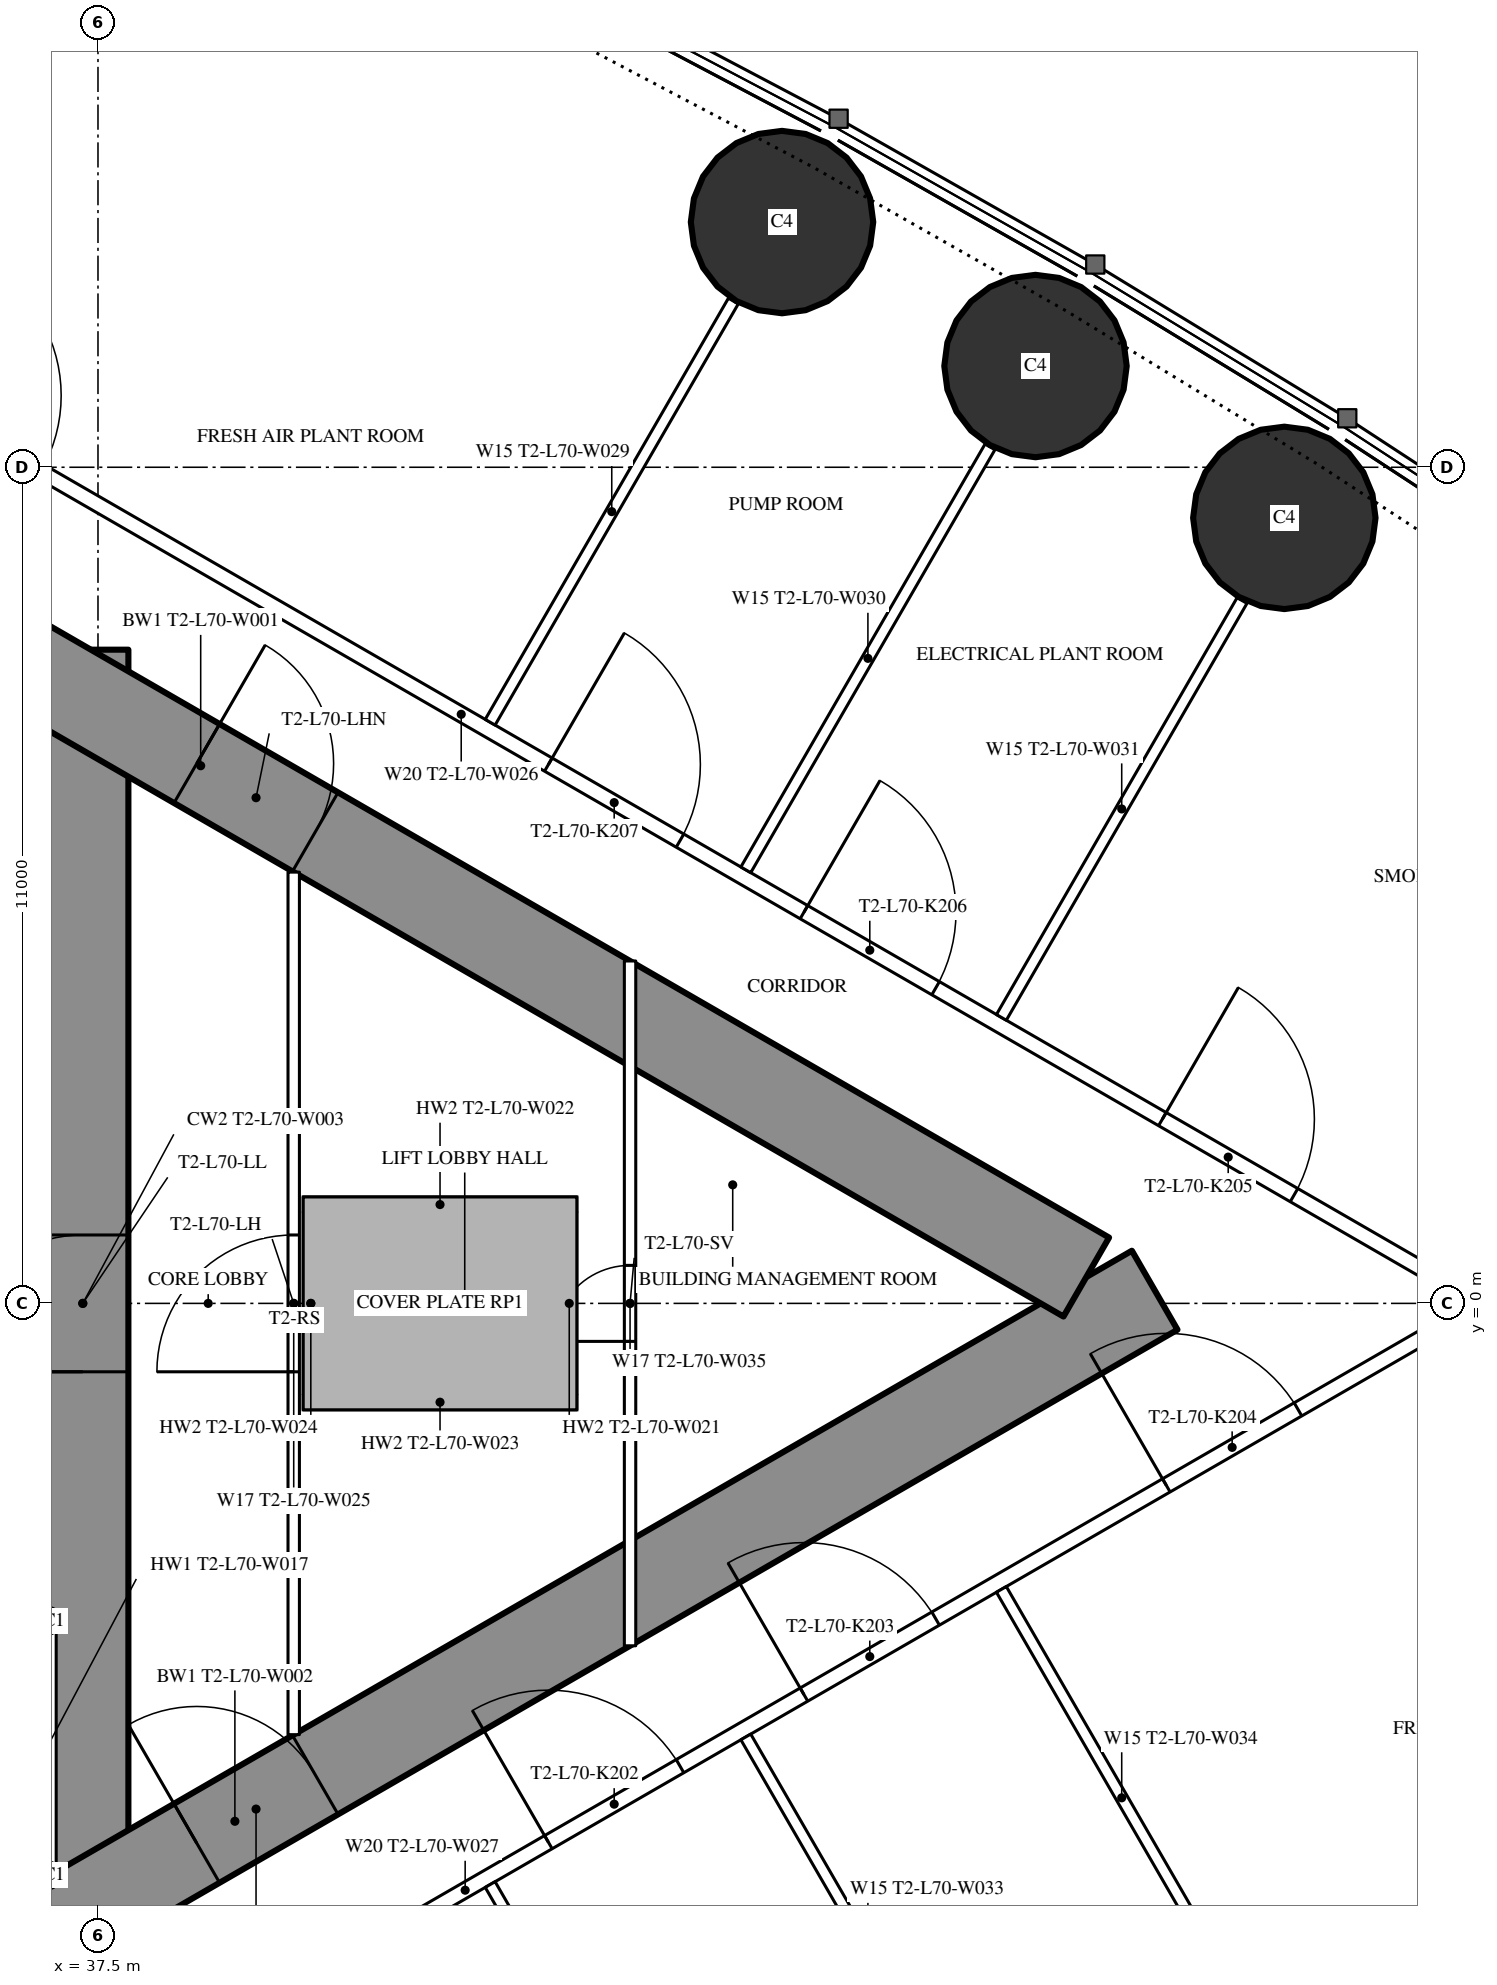
"""IFC4 building model, lengths in metres.
Left out: names, types, materials, properties, quantities, classifications, styles, units other than length and angle.
Written with IfcOpenShell. Run it as: python <this file> out.ifc"""

import sys

from ifc_helpers import new_model, si_unit, direction, frame, frame_2d, origin, origin_2d, place, context, subcontext, project, spatial, rectangle, circle, hollow_circle, extrude, element, fill, save


model = new_model("IFC4")
c1 = context("Model", 3, precision=1e-05, world=origin(), true_north=direction((0.0, 1.0)))
c2 = subcontext(c1, "Body", "Model", "MODEL_VIEW")
j1 = project(units=[si_unit("LENGTHUNIT", "METRE"), si_unit("PLANEANGLEUNIT", "RADIAN")], contexts=[c1])
p1 = place(None, origin())
s1 = spatial("IfcSite", under=j1, at=p1, CompositionType="ELEMENT")
p2 = place(p1, origin())
s2 = spatial("IfcBuilding", under=s1, at=p2, CompositionType="ELEMENT")
p3 = place(p2, frame((0.0, 0.0, 268.3)))
s3 = spatial("IfcBuildingStorey", under=s2, at=p3, CompositionType="ELEMENT", Elevation=268.3)
for number, where, z_axis, x_axis in (
    (1, (53.108, 10.334, 0.0), (0.0, 0.0, 1.0), (1.0, 0.0, 0.0)),
    (2, (49.834, 12.332, 0.0), (0.0, 0.0, 1.0), (1.0, 0.0, 0.0)),
    (3, (46.499, 14.226, 0.0), (0.0, 0.0, 1.0), (1.0, 0.0, 0.0)),
):
    element("IfcColumn", number, at=place(p3, frame(where, z_axis=z_axis, x_axis=x_axis)), inside=s3, PredefinedType="COLUMN", context=c2, shape_type="SweptSolid", body=[
        extrude(circle(Radius=1.2, at=origin_2d()), origin(), (0.0, 0.0, 1.0), 5.0),
    ])
p4 = place(p3, frame((37.3, -8.6, 0.0), z_axis=(0.0, 0.0, 1.0), x_axis=(0.0, 1.0, 0.0)))
e4 = element("IfcWall", 4, at=p4, inside=s3, PredefinedType="SHEAR", context=c2, shape_type="SweptSolid", body=[
    extrude(rectangle(XDim=17.2, YDim=1.2, at=frame_2d((8.6, 0.0))), origin(), (0.0, 0.0, 1.0), 5.0),
])
p5 = place(p4, frame((7.7, 0.0, 0.0)))
e5 = element("IfcOpeningElement", 5, at=p5, cuts=e4, PredefinedType="OPENING", context=c2, shape_type="SweptSolid", body=[
    extrude(rectangle(XDim=1.8, YDim=2.2, at=frame_2d((0.9, 1.1))), frame((0.0, 0.61, 0.0), z_axis=(0.0, -1.0, 0.0), x_axis=(1.0, 0.0, 0.0)), (0.0, 0.0, 1.0), 1.22),
])
p6 = place(p3, frame((27.2, -13.8, 0.0), z_axis=(0.0, 0.0, 1.0), x_axis=(0.866027159892, 0.499996958321, 0.0)))
e6 = element("IfcWall", 6, at=p6, inside=s3, PredefinedType="SHEAR", context=c2, shape_type="SweptSolid", body=[
    extrude(rectangle(XDim=27.947, YDim=1.2, at=frame_2d((13.973, 0.0))), origin(), (0.0, 0.0, 1.0), 5.0),
])
p7 = place(p6, frame((4.6, 0.0, 0.0)))
e7 = element("IfcOpeningElement", 7, at=p7, cuts=e6, PredefinedType="OPENING", context=c2, shape_type="SweptSolid", body=[
    extrude(rectangle(XDim=1.0, YDim=2.2, at=frame_2d((0.5, 1.1))), frame((0.0, 0.61, 0.0), z_axis=(0.0, -1.0, 0.0), x_axis=(1.0, 0.0, 0.0)), (0.0, 0.0, 1.0), 1.22),
])
p8 = place(p6, frame((13.395, 0.0, 0.0)))
e8 = element("IfcOpeningElement", 8, at=p8, cuts=e6, PredefinedType="OPENING", context=c2, shape_type="SweptSolid", body=[
    extrude(rectangle(XDim=1.8, YDim=2.2, at=frame_2d((0.9, 1.1))), frame((0.0, 0.61, 0.0), z_axis=(0.0, -1.0, 0.0), x_axis=(1.0, 0.0, 0.0)), (0.0, 0.0, 1.0), 1.22),
])
p9 = place(p3, frame((27.2, 13.8, 0.0), z_axis=(0.0, 0.0, 1.0), x_axis=(0.866024515034, -0.500001539357, 0.0)))
e9 = element("IfcWall", 9, at=p9, inside=s3, PredefinedType="SHEAR", context=c2, shape_type="SweptSolid", body=[
    extrude(rectangle(XDim=26.907, YDim=1.2, at=frame_2d((13.454, 0.0))), origin(), (0.0, 0.0, 1.0), 5.0),
])
p10 = place(p9, frame((4.6, 0.0, 0.0)))
e10 = element("IfcOpeningElement", 10, at=p10, cuts=e9, PredefinedType="OPENING", context=c2, shape_type="SweptSolid", body=[
    extrude(rectangle(XDim=1.0, YDim=2.2, at=frame_2d((0.5, 1.1))), frame((0.0, 0.61, 0.0), z_axis=(0.0, -1.0, 0.0), x_axis=(1.0, 0.0, 0.0)), (0.0, 0.0, 1.0), 1.22),
])
p11 = place(p9, frame((13.395, 0.0, 0.0)))
e11 = element("IfcOpeningElement", 11, at=p11, cuts=e9, PredefinedType="OPENING", context=c2, shape_type="SweptSolid", body=[
    extrude(rectangle(XDim=1.8, YDim=2.2, at=frame_2d((0.9, 1.1))), frame((0.0, 0.61, 0.0), z_axis=(0.0, -1.0, 0.0), x_axis=(1.0, 0.0, 0.0)), (0.0, 0.0, 1.0), 1.22),
])
for number, where, z_axis, x_axis in (
    (12, (36.825, -7.525, 5.0), (0.0, 0.0, 1.0), (1.0, 0.0, 0.0)),
    (13, (36.825, -4.175, 5.0), (0.0, 0.0, 1.0), (1.0, 0.0, 0.0)),
):
    element("IfcColumn", number, at=place(p3, frame(where, z_axis=z_axis, x_axis=x_axis)), inside=s3, PredefinedType="COLUMN", context=c2, shape_type="SweptSolid", body=[
        extrude(hollow_circle(Radius=0.162, WallThickness=0.012, at=origin_2d()), origin(), (0.0, 0.0, 1.0), 3.0),
    ])
p12 = place(p3, frame((36.825, -7.422, 5.0), z_axis=(0.0, 0.0, 1.0), x_axis=(0.0, 1.0, 0.0)))
e14 = element("IfcWall", 14, at=p12, inside=s3, PredefinedType="SOLIDWALL", context=c2, shape_type="SweptSolid", body=[
    extrude(rectangle(XDim=3.144, YDim=0.25, at=frame_2d((1.572, 0.0))), origin(), (0.0, 0.0, 1.0), 2.54),
])
for number, where, z_axis, x_axis in (
    (15, (40.2, -1.3, 5.0), (0.0, 0.0, 1.0), (1.0, 0.0, 0.0)),
    (16, (43.8, 1.3, 5.0), (0.0, 0.0, 1.0), (-1.0, 0.0, 0.0)),
):
    element("IfcWall", number, at=place(p3, frame(where, z_axis=z_axis, x_axis=x_axis)), inside=s3, PredefinedType="SOLIDWALL", context=c2, shape_type="SweptSolid", body=[
        extrude(rectangle(XDim=3.6, YDim=0.2, at=frame_2d((1.8, 0.0))), origin(), (0.0, 0.0, 1.0), 2.6),
    ])
p13 = place(p3, frame((40.3, 1.2, 5.0), z_axis=(0.0, 0.0, 1.0), x_axis=(0.0, -1.0, 0.0)))
e17 = element("IfcWall", 17, at=p13, inside=s3, PredefinedType="SOLIDWALL", context=c2, shape_type="SweptSolid", body=[
    extrude(rectangle(XDim=2.4, YDim=0.2, at=frame_2d((1.2, 0.0))), origin(), (0.0, 0.0, 1.0), 2.6),
])
p14 = place(p13, frame((0.7, 0.0, 0.0)))
e18 = element("IfcOpeningElement", 18, at=p14, cuts=e17, PredefinedType="OPENING", context=c2, shape_type="SweptSolid", body=[
    extrude(rectangle(XDim=1.0, YDim=2.2, at=frame_2d((0.5, 1.1))), frame((0.0, 0.11, 0.0), z_axis=(0.0, -1.0, 0.0), x_axis=(1.0, 0.0, 0.0)), (0.0, 0.0, 1.0), 0.22),
])
p15 = place(p3, frame((43.7, -1.2, 5.0), z_axis=(0.0, 0.0, 1.0), x_axis=(0.0, 1.0, 0.0)))
e19 = element("IfcWall", 19, at=p15, inside=s3, PredefinedType="SOLIDWALL", context=c2, shape_type="SweptSolid", body=[
    extrude(rectangle(XDim=2.4, YDim=0.2, at=frame_2d((1.2, 0.0))), origin(), (0.0, 0.0, 1.0), 2.6),
])
p16 = place(p3, frame((28.959, -15.44, 0.0), z_axis=(0.0, 0.0, 1.0), x_axis=(0.866025227435, 0.500000305447, 0.0)))
e20 = element("IfcWall", 20, at=p16, inside=s3, PredefinedType="PARTITIONING", context=c2, shape_type="SweptSolid", body=[
    extrude(rectangle(XDim=30.88, YDim=0.2, at=frame_2d((15.44, 0.0))), origin(), (0.0, 0.0, 1.0), 4.7),
])
p17 = place(p16, frame((6.994, 0.0, 0.0)))
e21 = element("IfcOpeningElement", 21, at=p17, cuts=e20, PredefinedType="OPENING", context=c2, shape_type="SweptSolid", body=[
    extrude(rectangle(XDim=2.0, YDim=2.4, at=frame_2d((1.0, 1.2))), frame((0.0, 0.11, 0.0), z_axis=(0.0, -1.0, 0.0), x_axis=(1.0, 0.0, 0.0)), (0.0, 0.0, 1.0), 0.22),
])
p18 = place(p16, frame((16.704, 0.0, 0.0)))
e22 = element("IfcOpeningElement", 22, at=p18, cuts=e20, PredefinedType="OPENING", context=c2, shape_type="SweptSolid", body=[
    extrude(rectangle(XDim=2.0, YDim=2.4, at=frame_2d((1.0, 1.2))), frame((0.0, 0.11, 0.0), z_axis=(0.0, -1.0, 0.0), x_axis=(1.0, 0.0, 0.0)), (0.0, 0.0, 1.0), 0.22),
])
p19 = place(p16, frame((20.587, 0.0, 0.0)))
e23 = element("IfcOpeningElement", 23, at=p19, cuts=e20, PredefinedType="OPENING", context=c2, shape_type="SweptSolid", body=[
    extrude(rectangle(XDim=2.0, YDim=2.4, at=frame_2d((1.0, 1.2))), frame((0.0, 0.11, 0.0), z_axis=(0.0, -1.0, 0.0), x_axis=(1.0, 0.0, 0.0)), (0.0, 0.0, 1.0), 0.22),
])
p20 = place(p16, frame((26.092, 0.0, 0.0)))
e24 = element("IfcOpeningElement", 24, at=p20, cuts=e20, PredefinedType="OPENING", context=c2, shape_type="SweptSolid", body=[
    extrude(rectangle(XDim=2.0, YDim=2.4, at=frame_2d((1.0, 1.2))), frame((0.0, 0.11, 0.0), z_axis=(0.0, -1.0, 0.0), x_axis=(1.0, 0.0, 0.0)), (0.0, 0.0, 1.0), 0.22),
])
p21 = place(p3, frame((28.959, 15.44, 0.0), z_axis=(0.0, 0.0, 1.0), x_axis=(0.866027378611, -0.499996579484, 0.0)))
e25 = element("IfcWall", 25, at=p21, inside=s3, PredefinedType="PARTITIONING", context=c2, shape_type="SweptSolid", body=[
    extrude(rectangle(XDim=30.76, YDim=0.2, at=frame_2d((15.38, 0.0))), origin(), (0.0, 0.0, 1.0), 4.7),
])
p22 = place(p21, frame((26.032, 0.0, 0.0)))
e26 = element("IfcOpeningElement", 26, at=p22, cuts=e25, PredefinedType="OPENING", context=c2, shape_type="SweptSolid", body=[
    extrude(rectangle(XDim=2.0, YDim=2.4, at=frame_2d((1.0, 1.2))), frame((0.0, 0.11, 0.0), z_axis=(0.0, -1.0, 0.0), x_axis=(1.0, 0.0, 0.0)), (0.0, 0.0, 1.0), 0.22),
])
p23 = place(p21, frame((20.587, 0.0, 0.0)))
e27 = element("IfcOpeningElement", 27, at=p23, cuts=e25, PredefinedType="OPENING", context=c2, shape_type="SweptSolid", body=[
    extrude(rectangle(XDim=2.0, YDim=2.4, at=frame_2d((1.0, 1.2))), frame((0.0, 0.11, 0.0), z_axis=(0.0, -1.0, 0.0), x_axis=(1.0, 0.0, 0.0)), (0.0, 0.0, 1.0), 0.22),
])
p24 = place(p21, frame((16.704, 0.0, 0.0)))
e28 = element("IfcOpeningElement", 28, at=p24, cuts=e25, PredefinedType="OPENING", context=c2, shape_type="SweptSolid", body=[
    extrude(rectangle(XDim=2.0, YDim=2.4, at=frame_2d((1.0, 1.2))), frame((0.0, 0.11, 0.0), z_axis=(0.0, -1.0, 0.0), x_axis=(1.0, 0.0, 0.0)), (0.0, 0.0, 1.0), 0.22),
])
p25 = place(p21, frame((6.994, 0.0, 0.0)))
e29 = element("IfcOpeningElement", 29, at=p25, cuts=e25, PredefinedType="OPENING", context=c2, shape_type="SweptSolid", body=[
    extrude(rectangle(XDim=2.0, YDim=2.4, at=frame_2d((1.0, 1.2))), frame((0.0, 0.11, 0.0), z_axis=(0.0, -1.0, 0.0), x_axis=(1.0, 0.0, 0.0)), (0.0, 0.0, 1.0), 0.22),
])
p26 = place(p3, frame((42.66, -7.646, 0.0), z_axis=(0.0, 0.0, 1.0), x_axis=(0.499996592859, -0.866027370889, 0.0)))
e30 = element("IfcWall", 30, at=p26, inside=s3, PredefinedType="PARTITIONING", context=c2, shape_type="SweptSolid", body=[
    extrude(rectangle(XDim=6.398, YDim=0.15, at=frame_2d((3.199, 0.0))), origin(), (0.0, 0.0, 1.0), 3.8),
])
p27 = place(p3, frame((46.023, -5.704, 0.0), z_axis=(0.0, 0.0, 1.0), x_axis=(0.499984478165, -0.866034365135, 0.0)))
e31 = element("IfcWall", 31, at=p27, inside=s3, PredefinedType="PARTITIONING", context=c2, shape_type="SweptSolid", body=[
    extrude(rectangle(XDim=6.426, YDim=0.15, at=frame_2d((3.213, 0.0))), origin(), (0.0, 0.0, 1.0), 3.8),
])
p28 = place(p3, frame((49.385, -3.763, 0.0), z_axis=(0.0, 0.0, 1.0), x_axis=(0.499999447814, -0.866025722589, 0.0)))
e32 = element("IfcWall", 32, at=p28, inside=s3, PredefinedType="PARTITIONING", context=c2, shape_type="SweptSolid", body=[
    extrude(rectangle(XDim=6.333, YDim=0.15, at=frame_2d((3.166, 0.0))), origin(), (0.0, 0.0, 1.0), 3.8),
])
p29 = place(p3, frame((42.66, 7.646, 0.0), z_axis=(0.0, 0.0, 1.0), x_axis=(0.499996592859, 0.866027370889, 0.0)))
e33 = element("IfcWall", 33, at=p29, inside=s3, PredefinedType="PARTITIONING", context=c2, shape_type="SweptSolid", body=[
    extrude(rectangle(XDim=6.398, YDim=0.15, at=frame_2d((3.199, 0.0))), origin(), (0.0, 0.0, 1.0), 3.8),
])
p30 = place(p3, frame((46.023, 5.704, 0.0), z_axis=(0.0, 0.0, 1.0), x_axis=(0.499984478165, 0.866034365135, 0.0)))
e34 = element("IfcWall", 34, at=p30, inside=s3, PredefinedType="PARTITIONING", context=c2, shape_type="SweptSolid", body=[
    extrude(rectangle(XDim=6.426, YDim=0.15, at=frame_2d((3.213, 0.0))), origin(), (0.0, 0.0, 1.0), 3.8),
])
p31 = place(p3, frame((49.385, 3.763, 0.0), z_axis=(0.0, 0.0, 1.0), x_axis=(0.499999447814, 0.866025722589, 0.0)))
e35 = element("IfcWall", 35, at=p31, inside=s3, PredefinedType="PARTITIONING", context=c2, shape_type="SweptSolid", body=[
    extrude(rectangle(XDim=6.333, YDim=0.15, at=frame_2d((3.166, 0.0))), origin(), (0.0, 0.0, 1.0), 3.8),
])
p32 = place(p3, frame((40.075, -5.674, 0.0), z_axis=(0.0, 0.0, 1.0), x_axis=(0.0, 1.0, 0.0)))
e36 = element("IfcWall", 36, at=p32, inside=s3, PredefinedType="PARTITIONING", context=c2, shape_type="SweptSolid", body=[
    extrude(rectangle(XDim=11.348, YDim=0.15, at=frame_2d((5.674, 0.0))), origin(), (0.0, 0.0, 1.0), 4.7),
])
p33 = place(p32, frame((4.774, 0.0, 0.0)))
e37 = element("IfcOpeningElement", 37, at=p33, cuts=e36, PredefinedType="OPENING", context=c2, shape_type="SweptSolid", body=[
    extrude(rectangle(XDim=1.8, YDim=2.2, at=frame_2d((0.9, 1.1))), frame((0.0, 0.085, 0.0), z_axis=(0.0, -1.0, 0.0), x_axis=(1.0, 0.0, 0.0)), (0.0, 0.0, 1.0), 0.17),
])
p34 = place(p3, frame((44.5, -4.505, 0.0), z_axis=(0.0, 0.0, 1.0), x_axis=(0.0, 1.0, 0.0)))
e38 = element("IfcWall", 38, at=p34, inside=s3, PredefinedType="PARTITIONING", context=c2, shape_type="SweptSolid", body=[
    extrude(rectangle(XDim=9.009, YDim=0.15, at=frame_2d((4.505, 0.0))), origin(), (0.0, 0.0, 1.0), 4.7),
])
p35 = place(p34, frame((4.005, 0.0, 0.0)))
e39 = element("IfcOpeningElement", 39, at=p35, cuts=e38, PredefinedType="OPENING", context=c2, shape_type="SweptSolid", body=[
    extrude(rectangle(XDim=1.0, YDim=2.2, at=frame_2d((0.5, 1.1))), frame((0.0, 0.085, 0.0), z_axis=(0.0, -1.0, 0.0), x_axis=(1.0, 0.0, 0.0)), (0.0, 0.0, 1.0), 0.17),
])
p36 = place(p14, origin())
e40 = element("IfcDoor", 40, at=p36, inside=s3, OperationType="SINGLE_SWING_LEFT", PredefinedType="DOOR", context=c2, shape_type="SweptSolid", body=[
    extrude(rectangle(XDim=1.0, YDim=2.2, at=frame_2d((0.5, 1.1))), frame((0.0, 0.025, 0.0), z_axis=(0.0, -1.0, 0.0), x_axis=(1.0, 0.0, 0.0)), (0.0, 0.0, 1.0), 0.05),
])
fill(e18, e40)
p37 = place(p18, origin())
e41 = element("IfcDoor", 41, at=p37, inside=s3, OperationType="DOUBLE_DOOR_SINGLE_SWING", PredefinedType="DOOR", context=c2, shape_type="SweptSolid", body=[
    extrude(rectangle(XDim=2.0, YDim=2.4, at=frame_2d((1.0, 1.2))), frame((0.0, 0.025, 0.0), z_axis=(0.0, -1.0, 0.0), x_axis=(1.0, 0.0, 0.0)), (0.0, 0.0, 1.0), 0.05),
])
fill(e22, e41)
p38 = place(p19, origin())
e42 = element("IfcDoor", 42, at=p38, inside=s3, OperationType="DOUBLE_DOOR_SINGLE_SWING", PredefinedType="DOOR", context=c2, shape_type="SweptSolid", body=[
    extrude(rectangle(XDim=2.0, YDim=2.4, at=frame_2d((1.0, 1.2))), frame((0.0, 0.025, 0.0), z_axis=(0.0, -1.0, 0.0), x_axis=(1.0, 0.0, 0.0)), (0.0, 0.0, 1.0), 0.05),
])
fill(e23, e42)
p39 = place(p20, origin())
e43 = element("IfcDoor", 43, at=p39, inside=s3, OperationType="DOUBLE_DOOR_SINGLE_SWING", PredefinedType="DOOR", context=c2, shape_type="SweptSolid", body=[
    extrude(rectangle(XDim=2.0, YDim=2.4, at=frame_2d((1.0, 1.2))), frame((0.0, 0.025, 0.0), z_axis=(0.0, -1.0, 0.0), x_axis=(1.0, 0.0, 0.0)), (0.0, 0.0, 1.0), 0.05),
])
fill(e24, e43)
p40 = place(p22, origin())
e44 = element("IfcDoor", 44, at=p40, inside=s3, OperationType="DOUBLE_DOOR_SINGLE_SWING", PredefinedType="DOOR", context=c2, shape_type="SweptSolid", body=[
    extrude(rectangle(XDim=2.0, YDim=2.4, at=frame_2d((1.0, 1.2))), frame((0.0, 0.025, 0.0), z_axis=(0.0, -1.0, 0.0), x_axis=(1.0, 0.0, 0.0)), (0.0, 0.0, 1.0), 0.05),
])
fill(e26, e44)
p41 = place(p23, origin())
e45 = element("IfcDoor", 45, at=p41, inside=s3, OperationType="DOUBLE_DOOR_SINGLE_SWING", PredefinedType="DOOR", context=c2, shape_type="SweptSolid", body=[
    extrude(rectangle(XDim=2.0, YDim=2.4, at=frame_2d((1.0, 1.2))), frame((0.0, 0.025, 0.0), z_axis=(0.0, -1.0, 0.0), x_axis=(1.0, 0.0, 0.0)), (0.0, 0.0, 1.0), 0.05),
])
fill(e27, e45)
p42 = place(p24, origin())
e46 = element("IfcDoor", 46, at=p42, inside=s3, OperationType="DOUBLE_DOOR_SINGLE_SWING", PredefinedType="DOOR", context=c2, shape_type="SweptSolid", body=[
    extrude(rectangle(XDim=2.0, YDim=2.4, at=frame_2d((1.0, 1.2))), frame((0.0, 0.025, 0.0), z_axis=(0.0, -1.0, 0.0), x_axis=(1.0, 0.0, 0.0)), (0.0, 0.0, 1.0), 0.05),
])
fill(e28, e46)
p43 = place(p33, origin())
e47 = element("IfcDoor", 47, at=p43, inside=s3, OperationType="DOUBLE_DOOR_SINGLE_SWING", PredefinedType="DOOR", context=c2, shape_type="SweptSolid", body=[
    extrude(rectangle(XDim=1.8, YDim=2.2, at=frame_2d((0.9, 1.1))), frame((0.0, 0.025, 0.0), z_axis=(0.0, -1.0, 0.0), x_axis=(1.0, 0.0, 0.0)), (0.0, 0.0, 1.0), 0.05),
])
fill(e37, e47)
p44 = place(p35, origin())
e48 = element("IfcDoor", 48, at=p44, inside=s3, OperationType="SINGLE_SWING_LEFT", PredefinedType="DOOR", context=c2, shape_type="SweptSolid", body=[
    extrude(rectangle(XDim=1.0, YDim=2.2, at=frame_2d((0.5, 1.1))), frame((0.0, 0.025, 0.0), z_axis=(0.0, -1.0, 0.0), x_axis=(1.0, 0.0, 0.0)), (0.0, 0.0, 1.0), 0.05),
])
fill(e39, e48)
p45 = place(p8, origin())
e49 = element("IfcDoor", 49, at=p45, inside=s3, OperationType="DOUBLE_DOOR_SINGLE_SWING", PredefinedType="DOOR", context=c2, shape_type="SweptSolid", body=[
    extrude(rectangle(XDim=1.8, YDim=2.2, at=frame_2d((0.9, 1.1))), frame((0.0, 0.025, 0.0), z_axis=(0.0, -1.0, 0.0), x_axis=(1.0, 0.0, 0.0)), (0.0, 0.0, 1.0), 0.05),
])
fill(e8, e49)
p46 = place(p11, origin())
e50 = element("IfcDoor", 50, at=p46, inside=s3, OperationType="DOUBLE_DOOR_SINGLE_SWING", PredefinedType="DOOR", context=c2, shape_type="SweptSolid", body=[
    extrude(rectangle(XDim=1.8, YDim=2.2, at=frame_2d((0.9, 1.1))), frame((0.0, 0.025, 0.0), z_axis=(0.0, -1.0, 0.0), x_axis=(1.0, 0.0, 0.0)), (0.0, 0.0, 1.0), 0.05),
])
fill(e11, e50)
p47 = place(p5, origin())
e51 = element("IfcDoor", 51, at=p47, inside=s3, OperationType="DOUBLE_DOOR_SINGLE_SWING", PredefinedType="DOOR", context=c2, shape_type="SweptSolid", body=[
    extrude(rectangle(XDim=1.8, YDim=2.2, at=frame_2d((0.9, 1.1))), frame((0.0, 0.025, 0.0), z_axis=(0.0, -1.0, 0.0), x_axis=(1.0, 0.0, 0.0)), (0.0, 0.0, 1.0), 0.05),
])
fill(e5, e51)
save(model, sys.argv[1])
